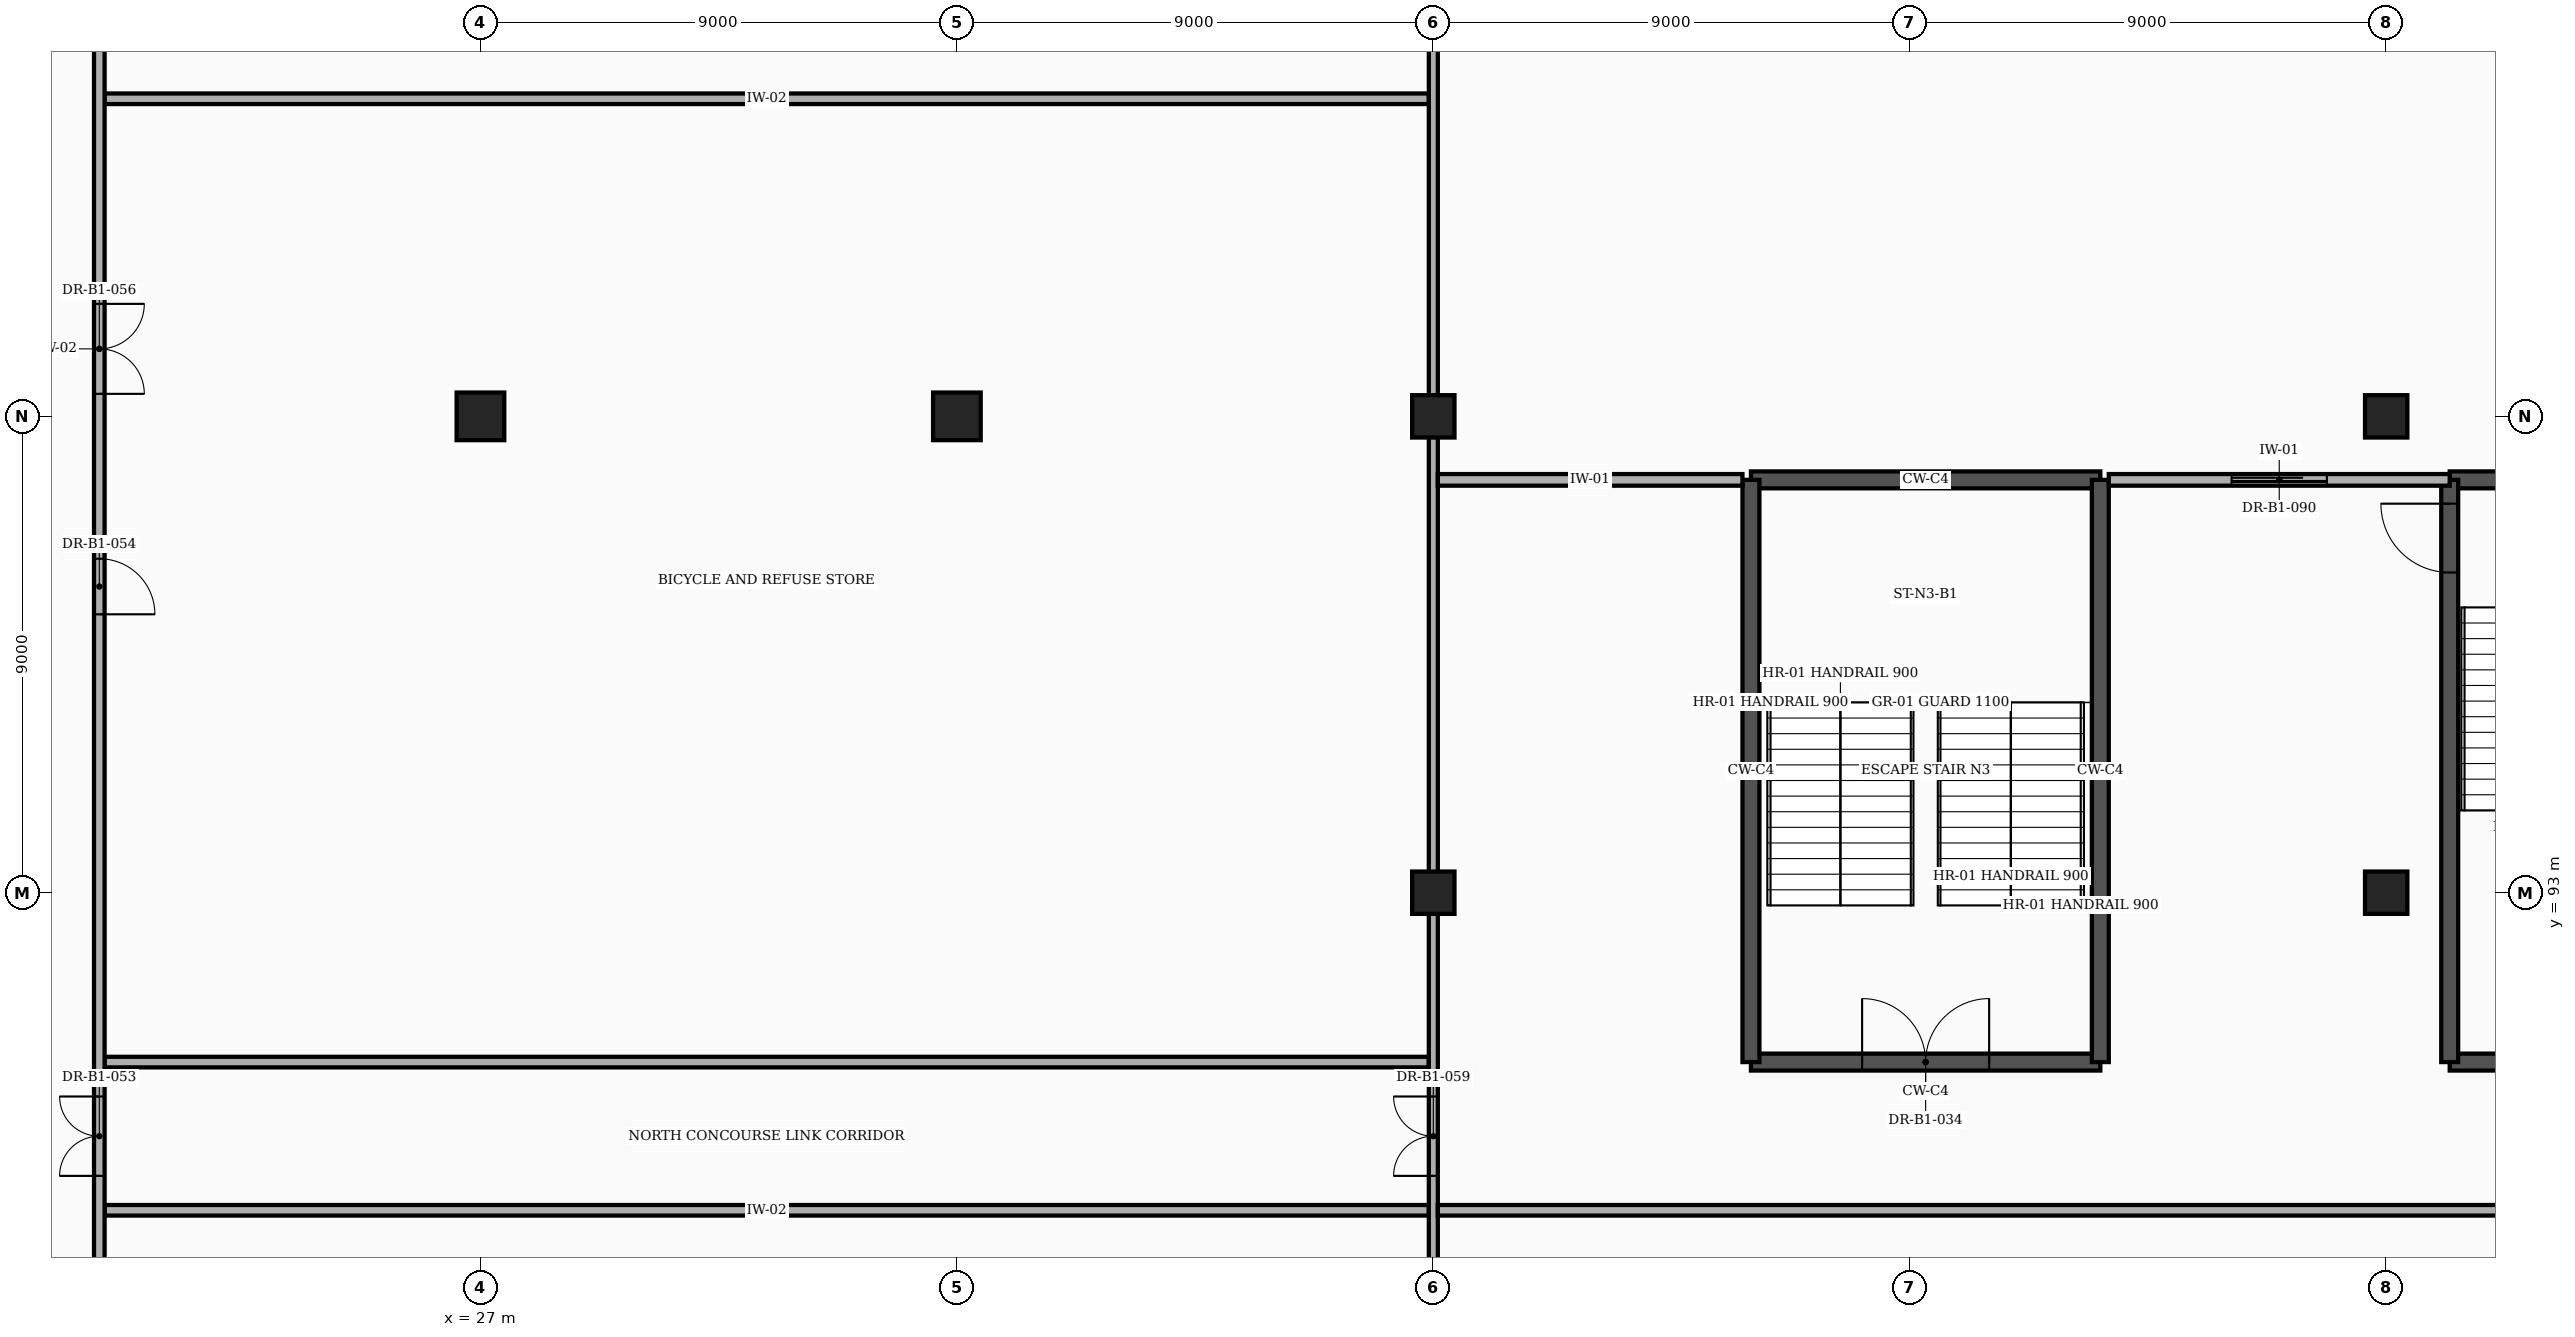
"""IFC4 building model, lengths in metres.
Left out: names, types, materials, properties, quantities, classifications, styles, units other than length and angle.
Written with IfcOpenShell. Run it as: python <this file> out.ifc"""

import sys

from ifc_helpers import new_model, si_unit, direction, frame, frame_2d, origin, origin_2d, place, context, subcontext, project, spatial, rectangle, extrude, element, fill, save


model = new_model("IFC4")
c1 = context("Model", 3, precision=1e-05, world=origin(), true_north=direction((0.0, 1.0)))
c2 = subcontext(c1, "Body", "Model", "MODEL_VIEW")
j1 = project(units=[si_unit("LENGTHUNIT", "METRE"), si_unit("PLANEANGLEUNIT", "RADIAN")], contexts=[c1])
p1 = place(None, origin())
s1 = spatial("IfcSite", under=j1, at=p1, CompositionType="ELEMENT")
p2 = place(p1, origin())
s2 = spatial("IfcBuilding", under=s1, at=p2, CompositionType="ELEMENT")
p3 = place(p2, frame((0.0, 0.0, -4.5)))
s3 = spatial("IfcBuildingStorey", under=s2, at=p3, CompositionType="ELEMENT", Elevation=-4.5)
for number, where, z_axis, x_axis in (
    (1, (27.0, 102.0, -0.45), (0.0, 0.0, 1.0), (1.0, 0.0, 0.0)),
    (2, (36.0, 102.0, -0.45), (0.0, 0.0, 1.0), (1.0, 0.0, 0.0)),
):
    element("IfcColumn", number, at=place(p3, frame(where, z_axis=z_axis, x_axis=x_axis)), inside=s3, PredefinedType="COLUMN", context=c2, shape_type="SweptSolid", body=[
        extrude(rectangle(XDim=0.9, YDim=0.9, at=origin_2d()), origin(), (0.0, 0.0, 1.0), 4.95),
    ])
for number, where, z_axis, x_axis in (
    (3, (45.0, 93.0, -0.45), (0.0, 0.0, 1.0), (1.0, 0.0, 0.0)),
    (4, (45.0, 102.0, -0.45), (0.0, 0.0, 1.0), (1.0, 0.0, 0.0)),
    (5, (63.0, 93.0, -0.45), (0.0, 0.0, 1.0), (1.0, 0.0, 0.0)),
    (6, (63.0, 102.0, -0.45), (0.0, 0.0, 1.0), (1.0, 0.0, 0.0)),
):
    element("IfcColumn", number, at=place(p3, frame(where, z_axis=z_axis, x_axis=x_axis)), inside=s3, PredefinedType="COLUMN", context=c2, shape_type="SweptSolid", body=[
        extrude(rectangle(XDim=0.8, YDim=0.8, at=origin_2d()), origin(), (0.0, 0.0, 1.0), 4.95),
    ])
for number, where, z_axis, x_axis in (
    (7, (64.2, 89.8, 0.0), (0.0, 0.0, 1.0), (1.0, 0.0, 0.0)),
    (8, (64.2, 100.8, 0.0), (0.0, 0.0, 1.0), (1.0, 0.0, 0.0)),
):
    element("IfcWall", number, at=place(p3, frame(where, z_axis=z_axis, x_axis=x_axis)), inside=s3, PredefinedType="SHEAR", context=c2, shape_type="SweptSolid", body=[
        extrude(rectangle(XDim=6.6, YDim=0.32, at=frame_2d((3.3, 0.0))), origin(), (0.0, 0.0, 1.0), 4.24),
    ])
p4 = place(p3, frame((64.2, 89.8, 0.0), z_axis=(0.0, 0.0, 1.0), x_axis=(0.0, 1.0, 0.0)))
e9 = element("IfcWall", 9, at=p4, inside=s3, PredefinedType="SHEAR", context=c2, shape_type="SweptSolid", body=[
    extrude(rectangle(XDim=11.0, YDim=0.32, at=frame_2d((5.5, 0.0))), origin(), (0.0, 0.0, 1.0), 4.24),
])
p5 = place(p4, frame((9.25, 0.0, 0.0)))
e10 = element("IfcOpeningElement", 10, at=p5, cuts=e9, PredefinedType="OPENING", context=c2, shape_type="SweptSolid", body=[
    extrude(rectangle(XDim=1.3, YDim=2.2, at=frame_2d((0.65, 1.1))), frame((0.0, 0.172, 0.0), z_axis=(0.0, -1.0, 0.0), x_axis=(1.0, 0.0, 0.0)), (0.0, 0.0, 1.0), 0.344),
])
p6 = place(p3, frame((51.0, 89.8, 0.0), z_axis=(0.0, 0.0, 1.0), x_axis=(1.0, 0.0, 0.0)))
e11 = element("IfcWall", 11, at=p6, inside=s3, PredefinedType="SHEAR", context=c2, shape_type="SweptSolid", body=[
    extrude(rectangle(XDim=6.6, YDim=0.32, at=frame_2d((3.3, 0.0))), origin(), (0.0, 0.0, 1.0), 4.24),
])
p7 = place(p6, frame((2.1, 0.0, 0.0)))
e12 = element("IfcOpeningElement", 12, at=p7, cuts=e11, PredefinedType="OPENING", context=c2, shape_type="SweptSolid", body=[
    extrude(rectangle(XDim=2.4, YDim=2.25, at=frame_2d((1.2, 1.125))), frame((0.0, 0.172, 0.0), z_axis=(0.0, -1.0, 0.0), x_axis=(1.0, 0.0, 0.0)), (0.0, 0.0, 1.0), 0.344),
])
p8 = place(p3, frame((51.0, 100.8, 0.0), z_axis=(0.0, 0.0, 1.0), x_axis=(1.0, 0.0, 0.0)))
e13 = element("IfcWall", 13, at=p8, inside=s3, PredefinedType="SHEAR", context=c2, shape_type="SweptSolid", body=[
    extrude(rectangle(XDim=6.6, YDim=0.32, at=frame_2d((3.3, 0.0))), origin(), (0.0, 0.0, 1.0), 4.24),
])
for number, where, z_axis, x_axis in (
    (14, (51.0, 89.8, 0.0), (0.0, 0.0, 1.0), (0.0, 1.0, 0.0)),
    (15, (57.6, 89.8, 0.0), (0.0, 0.0, 1.0), (0.0, 1.0, 0.0)),
):
    element("IfcWall", number, at=place(p3, frame(where, z_axis=z_axis, x_axis=x_axis)), inside=s3, PredefinedType="SHEAR", context=c2, shape_type="SweptSolid", body=[
        extrude(rectangle(XDim=11.0, YDim=0.32, at=frame_2d((5.5, 0.0))), origin(), (0.0, 0.0, 1.0), 4.24),
    ])
for number, where, z_axis, x_axis in (
    (16, (19.9, 87.0, 0.0), (0.0, 0.0, 1.0), (1.0, 0.0, 0.0)),
    (17, (19.9, 89.8, 0.0), (0.0, 0.0, 1.0), (1.0, 0.0, 0.0)),
    (18, (19.9, 108.0, 0.0), (0.0, 0.0, 1.0), (1.0, 0.0, 0.0)),
):
    element("IfcWall", number, at=place(p3, frame(where, z_axis=z_axis, x_axis=x_axis)), inside=s3, PredefinedType="PARTITIONING", context=c2, shape_type="SweptSolid", body=[
        extrude(rectangle(XDim=25.015, YDim=0.2, at=frame_2d((12.508, 0.0))), origin(), (0.0, 0.0, 1.0), 4.24),
    ])
p9 = place(p3, frame((19.8, 80.76, 0.0), z_axis=(0.0, 0.0, 1.0), x_axis=(0.0, 1.0, 0.0)))
e19 = element("IfcWall", 19, at=p9, inside=s3, PredefinedType="PARTITIONING", context=c2, shape_type="SweptSolid", body=[
    extrude(rectangle(XDim=45.03, YDim=0.2, at=frame_2d((22.515, 0.0))), origin(), (0.0, 0.0, 1.0), 4.24),
])
p10 = place(p9, frame((6.89, 0.0, 0.0)))
e20 = element("IfcOpeningElement", 20, at=p10, cuts=e19, PredefinedType="OPENING", context=c2, shape_type="SweptSolid", body=[
    extrude(rectangle(XDim=1.5, YDim=2.2, at=frame_2d((0.75, 1.1))), frame((0.0, 0.112, 0.0), z_axis=(0.0, -1.0, 0.0), x_axis=(1.0, 0.0, 0.0)), (0.0, 0.0, 1.0), 0.224),
])
p11 = place(p9, frame((17.5, 0.0, 0.0)))
e21 = element("IfcOpeningElement", 21, at=p11, cuts=e19, PredefinedType="OPENING", context=c2, shape_type="SweptSolid", body=[
    extrude(rectangle(XDim=1.05, YDim=2.15, at=frame_2d((0.525, 1.075))), frame((0.0, 0.112, 0.0), z_axis=(0.0, -1.0, 0.0), x_axis=(1.0, 0.0, 0.0)), (0.0, 0.0, 1.0), 0.224),
])
p12 = place(p9, frame((35.44, 0.0, 0.0)))
e22 = element("IfcOpeningElement", 22, at=p12, cuts=e19, PredefinedType="OPENING", context=c2, shape_type="SweptSolid", body=[
    extrude(rectangle(XDim=1.6, YDim=2.3, at=frame_2d((0.8, 1.15))), frame((0.0, 0.112, 0.0), z_axis=(0.0, -1.0, 0.0), x_axis=(1.0, 0.0, 0.0)), (0.0, 0.0, 1.0), 0.224),
])
p13 = place(p9, frame((21.665, 0.0, 0.0)))
e23 = element("IfcOpeningElement", 23, at=p13, cuts=e19, PredefinedType="OPENING", context=c2, shape_type="SweptSolid", body=[
    extrude(rectangle(XDim=1.7, YDim=2.3, at=frame_2d((0.85, 1.15))), frame((0.0, 0.112, 0.0), z_axis=(0.0, -1.0, 0.0), x_axis=(1.0, 0.0, 0.0)), (0.0, 0.0, 1.0), 0.224),
])
p14 = place(p9, frame((0.3, 0.0, 0.0)))
e24 = element("IfcOpeningElement", 24, at=p14, cuts=e19, PredefinedType="OPENING", context=c2, shape_type="SweptSolid", body=[
    extrude(rectangle(XDim=1.7, YDim=2.3, at=frame_2d((0.85, 1.15))), frame((0.0, 0.112, 0.0), z_axis=(0.0, -1.0, 0.0), x_axis=(1.0, 0.0, 0.0)), (0.0, 0.0, 1.0), 0.224),
])
p15 = place(p3, frame((45.0, 84.22, 0.0), z_axis=(0.0, 0.0, 1.0), x_axis=(0.0, 1.0, 0.0)))
e25 = element("IfcWall", 25, at=p15, inside=s3, PredefinedType="PARTITIONING", context=c2, shape_type="SweptSolid", body=[
    extrude(rectangle(XDim=8.56, YDim=0.17, at=frame_2d((4.28, 0.0))), origin(), (0.0, 0.0, 1.0), 3.707),
])
p16 = place(p15, frame((3.43, 0.0, 0.0)))
e26 = element("IfcOpeningElement", 26, at=p16, cuts=e25, PredefinedType="OPENING", context=c2, shape_type="SweptSolid", body=[
    extrude(rectangle(XDim=1.5, YDim=2.2, at=frame_2d((0.75, 1.1))), frame((0.0, 0.097, 0.0), z_axis=(0.0, -1.0, 0.0), x_axis=(1.0, 0.0, 0.0)), (0.0, 0.0, 1.0), 0.194),
])
p17 = place(p3, frame((45.0, 93.22, 0.0), z_axis=(0.0, 0.0, 1.0), x_axis=(0.0, 1.0, 0.0)))
e27 = element("IfcWall", 27, at=p17, inside=s3, PredefinedType="PARTITIONING", context=c2, shape_type="SweptSolid", body=[
    extrude(rectangle(XDim=8.56, YDim=0.17, at=frame_2d((4.28, 0.0))), origin(), (0.0, 0.0, 1.0), 3.707),
])
p18 = place(p3, frame((45.0, 102.22, 0.0), z_axis=(0.0, 0.0, 1.0), x_axis=(0.0, 1.0, 0.0)))
e28 = element("IfcWall", 28, at=p18, inside=s3, PredefinedType="PARTITIONING", context=c2, shape_type="SweptSolid", body=[
    extrude(rectangle(XDim=17.56, YDim=0.17, at=frame_2d((8.78, 0.0))), origin(), (0.0, 0.0, 1.0), 3.707),
])
p19 = place(p3, frame((45.085, 87.0, 0.0), z_axis=(0.0, 0.0, 1.0), x_axis=(1.0, 0.0, 0.0)))
e29 = element("IfcWall", 29, at=p19, inside=s3, PredefinedType="PARTITIONING", context=c2, shape_type="SweptSolid", body=[
    extrude(rectangle(XDim=107.83, YDim=0.2, at=frame_2d((53.915, 0.0))), origin(), (0.0, 0.0, 1.0), 4.24),
])
p20 = place(p19, frame((36.0, 0.0, 0.0)))
e30 = element("IfcOpeningElement", 30, at=p20, cuts=e29, PredefinedType="OPENING", context=c2, shape_type="SweptSolid", body=[
    extrude(rectangle(XDim=1.6, YDim=2.3, at=frame_2d((0.8, 1.15))), frame((0.0, 0.112, 0.0), z_axis=(0.0, -1.0, 0.0), x_axis=(1.0, 0.0, 0.0)), (0.0, 0.0, 1.0), 0.224),
])
p21 = place(p19, frame((92.0, 0.0, 0.0)))
e31 = element("IfcOpeningElement", 31, at=p21, cuts=e29, PredefinedType="OPENING", context=c2, shape_type="SweptSolid", body=[
    extrude(rectangle(XDim=1.8, YDim=2.5, at=frame_2d((0.9, 1.25))), frame((0.0, 0.112, 0.0), z_axis=(0.0, -1.0, 0.0), x_axis=(1.0, 0.0, 0.0)), (0.0, 0.0, 1.0), 0.224),
])
p22 = place(p3, frame((45.085, 100.8, 0.0), z_axis=(0.0, 0.0, 1.0), x_axis=(1.0, 0.0, 0.0)))
e32 = element("IfcWall", 32, at=p22, inside=s3, PredefinedType="PARTITIONING", context=c2, shape_type="SweptSolid", body=[
    extrude(rectangle(XDim=5.755, YDim=0.22, at=frame_2d((2.877, 0.0))), origin(), (0.0, 0.0, 1.0), 4.24),
])
p23 = place(p3, frame((57.76, 100.8, 0.0), z_axis=(0.0, 0.0, 1.0), x_axis=(1.0, 0.0, 0.0)))
e33 = element("IfcWall", 33, at=p23, inside=s3, PredefinedType="PARTITIONING", context=c2, shape_type="SweptSolid", body=[
    extrude(rectangle(XDim=6.44, YDim=0.22, at=frame_2d((3.22, 0.0))), origin(), (0.0, 0.0, 1.0), 4.24),
])
p24 = place(p23, frame((2.32, 0.0, 0.0)))
e34 = element("IfcOpeningElement", 34, at=p24, cuts=e33, PredefinedType="OPENING", context=c2, shape_type="SweptSolid", body=[
    extrude(rectangle(XDim=1.8, YDim=2.5, at=frame_2d((0.9, 1.25))), frame((0.0, 0.122, 0.0), z_axis=(0.0, -1.0, 0.0), x_axis=(1.0, 0.0, 0.0)), (0.0, 0.0, 1.0), 0.244),
])
p25 = place(p5, origin())
e35 = element("IfcDoor", 35, at=p25, inside=s3, OperationType="SINGLE_SWING_RIGHT", PredefinedType="DOOR", context=c2, shape_type="SweptSolid", body=[
    extrude(rectangle(XDim=1.3, YDim=2.2, at=frame_2d((0.65, 1.1))), frame((0.0, 0.025, 0.0), z_axis=(0.0, -1.0, 0.0), x_axis=(1.0, 0.0, 0.0)), (0.0, 0.0, 1.0), 0.05),
])
fill(e10, e35)
p26 = place(p7, origin())
e36 = element("IfcDoor", 36, at=p26, inside=s3, OperationType="DOUBLE_DOOR_SINGLE_SWING", PredefinedType="DOOR", context=c2, shape_type="SweptSolid", body=[
    extrude(rectangle(XDim=2.4, YDim=2.25, at=frame_2d((1.2, 1.125))), frame((0.0, 0.025, 0.0), z_axis=(0.0, -1.0, 0.0), x_axis=(1.0, 0.0, 0.0)), (0.0, 0.0, 1.0), 0.05),
])
fill(e12, e36)
p27 = place(p10, origin())
e37 = element("IfcDoor", 37, at=p27, inside=s3, OperationType="DOUBLE_DOOR_SINGLE_SWING", PredefinedType="DOOR", context=c2, shape_type="SweptSolid", body=[
    extrude(rectangle(XDim=1.5, YDim=2.2, at=frame_2d((0.75, 1.1))), frame((0.0, 0.025, 0.0), z_axis=(0.0, -1.0, 0.0), x_axis=(1.0, 0.0, 0.0)), (0.0, 0.0, 1.0), 0.05),
])
fill(e20, e37)
p28 = place(p11, frame((1.05, 0.0, 0.0), z_axis=(0.0, 0.0, 1.0), x_axis=(-1.0, 0.0, 0.0)))
e38 = element("IfcDoor", 38, at=p28, inside=s3, OperationType="SINGLE_SWING_RIGHT", PredefinedType="DOOR", context=c2, shape_type="SweptSolid", body=[
    extrude(rectangle(XDim=1.05, YDim=2.15, at=frame_2d((0.525, 1.075))), frame((0.0, 0.025, 0.0), z_axis=(0.0, -1.0, 0.0), x_axis=(1.0, 0.0, 0.0)), (0.0, 0.0, 1.0), 0.05),
])
fill(e21, e38)
p29 = place(p13, frame((1.7, 0.0, 0.0), z_axis=(0.0, 0.0, 1.0), x_axis=(-1.0, 0.0, 0.0)))
e39 = element("IfcDoor", 39, at=p29, inside=s3, OperationType="DOUBLE_DOOR_SINGLE_SWING", PredefinedType="DOOR", context=c2, shape_type="SweptSolid", body=[
    extrude(rectangle(XDim=1.7, YDim=2.3, at=frame_2d((0.85, 1.15))), frame((0.0, 0.025, 0.0), z_axis=(0.0, -1.0, 0.0), x_axis=(1.0, 0.0, 0.0)), (0.0, 0.0, 1.0), 0.05),
])
fill(e23, e39)
p30 = place(p16, origin())
e40 = element("IfcDoor", 40, at=p30, inside=s3, OperationType="DOUBLE_DOOR_SINGLE_SWING", PredefinedType="DOOR", context=c2, shape_type="SweptSolid", body=[
    extrude(rectangle(XDim=1.5, YDim=2.2, at=frame_2d((0.75, 1.1))), frame((0.0, 0.025, 0.0), z_axis=(0.0, -1.0, 0.0), x_axis=(1.0, 0.0, 0.0)), (0.0, 0.0, 1.0), 0.05),
])
fill(e26, e40)
p31 = place(p24, origin())
e41 = element("IfcDoor", 41, at=p31, inside=s3, OperationType="SLIDING_TO_LEFT", PredefinedType="DOOR", context=c2, shape_type="SweptSolid", body=[
    extrude(rectangle(XDim=1.8, YDim=2.5, at=frame_2d((0.9, 1.25))), frame((0.0, 0.025, 0.0), z_axis=(0.0, -1.0, 0.0), x_axis=(1.0, 0.0, 0.0)), (0.0, 0.0, 1.0), 0.05),
])
fill(e34, e41)
save(model, sys.argv[1])
